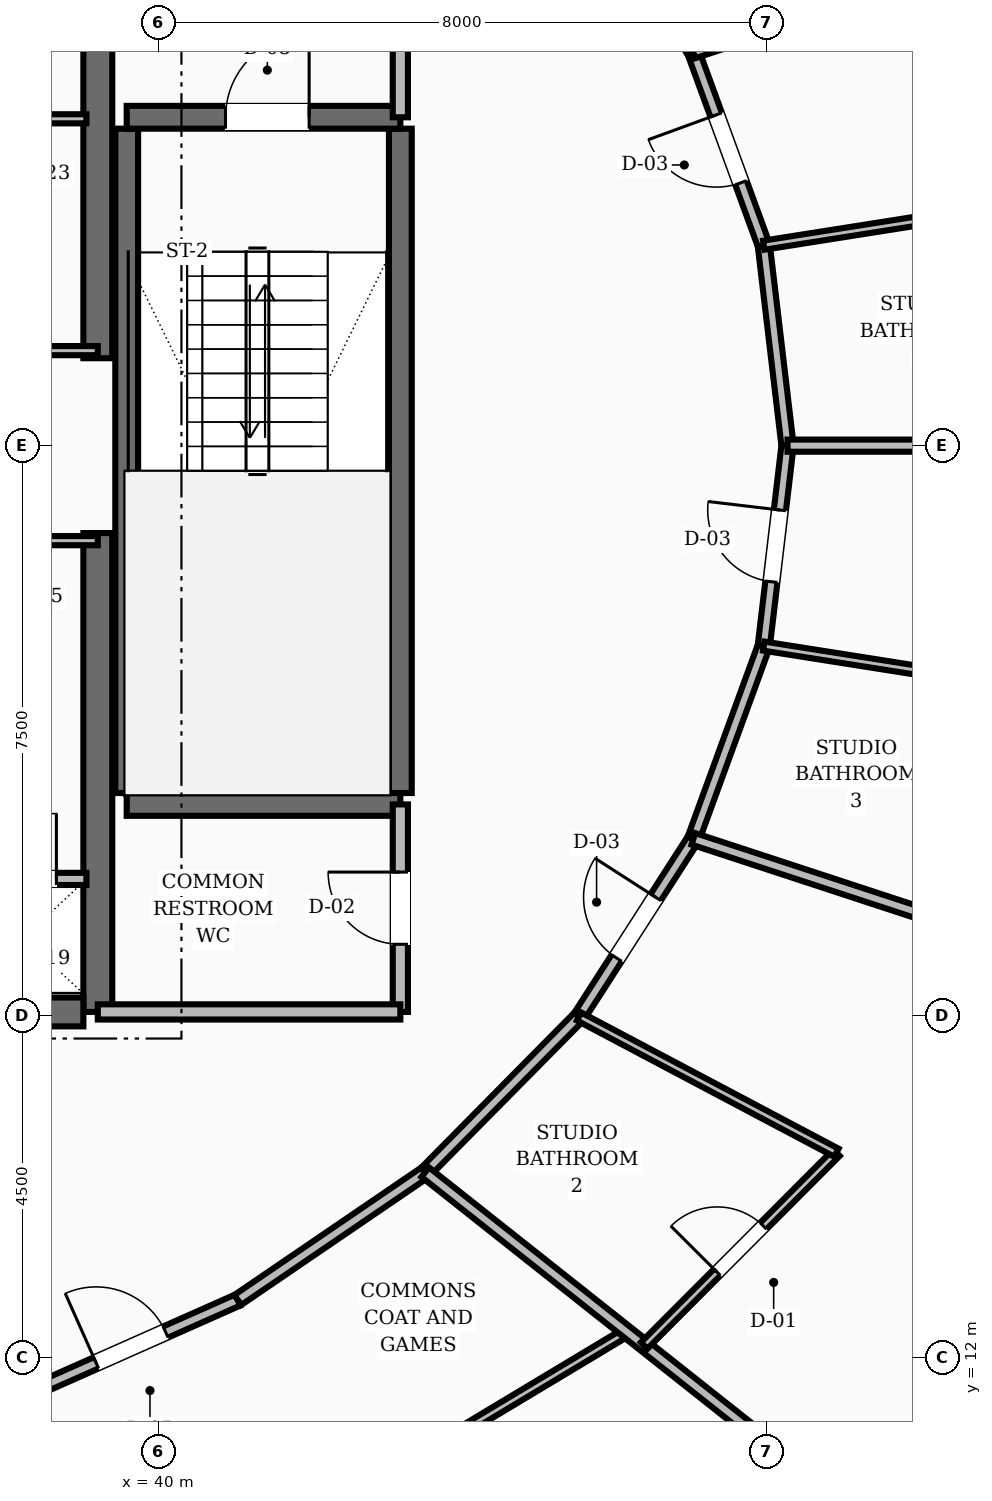
"""IFC4 building model, lengths in metres.
Left out: names, types, materials, properties, quantities, classifications, styles, units other than length and angle.
Written with IfcOpenShell. Run it as: python <this file> out.ifc"""

import sys

from ifc_helpers import new_model, si_unit, direction, frame, frame_2d, origin, place, context, subcontext, project, spatial, rectangle, extrude, element, fill, save


model = new_model("IFC4")
c1 = context("Model", 3, precision=1e-05, world=origin(), true_north=direction((0.0, 1.0)))
c2 = subcontext(c1, "Body", "Model", "MODEL_VIEW")
j1 = project(units=[si_unit("LENGTHUNIT", "METRE"), si_unit("PLANEANGLEUNIT", "RADIAN")], contexts=[c1])
p1 = place(None, origin())
s1 = spatial("IfcSite", under=j1, at=p1, CompositionType="ELEMENT")
p2 = place(p1, origin())
s2 = spatial("IfcBuilding", under=s1, at=p2, CompositionType="ELEMENT")
p3 = place(p2, frame((0.0, 0.0, 88.0)))
s3 = spatial("IfcBuildingStorey", under=s2, at=p3, CompositionType="ELEMENT", Elevation=88.0)
for number, where, z_axis, x_axis in (
    (1, (39.2, 16.55, 0.0), (0.0, 0.0, 1.0), (0.0, 1.0, 0.0)),
    (2, (39.2, 25.15, 0.0), (0.0, 0.0, 1.0), (0.0, 1.0, 0.0)),
):
    element("IfcWall", number, at=place(p3, frame(where, z_axis=z_axis, x_axis=x_axis)), inside=s3, PredefinedType="SHEAR", context=c2, shape_type="SweptSolid", body=[
        extrude(rectangle(XDim=6.3, YDim=0.38, at=frame_2d((3.15, 0.0))), origin(), (0.0, 0.0, 1.0), 3.6),
    ])
p4 = place(p3, frame((35.8, 16.55, 0.0), z_axis=(0.0, 0.0, 1.0), x_axis=(1.0, 0.0, 0.0)))
e3 = element("IfcWall", 3, at=p4, inside=s3, PredefinedType="SHEAR", context=c2, shape_type="SweptSolid", body=[
    extrude(rectangle(XDim=3.21, YDim=0.38, at=frame_2d((1.605, 0.0))), origin(), (0.0, 0.0, 1.0), 3.6),
])
p5 = place(p4, frame((0.3, 0.0, 0.0)))
e4 = element("IfcOpeningElement", 4, at=p5, cuts=e3, PredefinedType="OPENING", context=c2, shape_type="SweptSolid", body=[
    extrude(rectangle(XDim=1.1, YDim=2.1, at=frame_2d((0.55, 1.05))), frame((0.0, 0.2, 0.0), z_axis=(0.0, -1.0, 0.0), x_axis=(1.0, 0.0, 0.0)), (0.0, 0.0, 1.0), 0.4),
])
for number, where, z_axis, x_axis in (
    (5, (43.18, 19.43, 0.0), (0.0, 0.0, 1.0), (0.0, 1.0, 0.0)),
    (6, (39.58, 19.43, 0.0), (0.0, 0.0, 1.0), (0.0, 1.0, 0.0)),
):
    element("IfcWall", number, at=place(p3, frame(where, z_axis=z_axis, x_axis=x_axis)), inside=s3, PredefinedType="SHEAR", context=c2, shape_type="SweptSolid", body=[
        extrude(rectangle(XDim=8.74, YDim=0.3, at=frame_2d((4.37, 0.0))), origin(), (0.0, 0.0, 1.0), 3.6),
    ])
p6 = place(p3, frame((39.58, 19.28, 0.0), z_axis=(0.0, 0.0, 1.0), x_axis=(1.0, 0.0, 0.0)))
e7 = element("IfcWall", 7, at=p6, inside=s3, PredefinedType="SHEAR", context=c2, shape_type="SweptSolid", body=[
    extrude(rectangle(XDim=3.6, YDim=0.3, at=frame_2d((1.8, 0.0))), origin(), (0.0, 0.0, 1.0), 3.6),
])
p7 = place(p3, frame((39.58, 28.32, 0.0), z_axis=(0.0, 0.0, 1.0), x_axis=(1.0, 0.0, 0.0)))
e8 = element("IfcWall", 8, at=p7, inside=s3, PredefinedType="SHEAR", context=c2, shape_type="SweptSolid", body=[
    extrude(rectangle(XDim=3.6, YDim=0.3, at=frame_2d((1.8, 0.0))), origin(), (0.0, 0.0, 1.0), 3.6),
])
p8 = place(p7, frame((1.3, 0.0, 0.0)))
e9 = element("IfcOpeningElement", 9, at=p8, cuts=e8, PredefinedType="OPENING", context=c2, shape_type="SweptSolid", body=[
    extrude(rectangle(XDim=1.1, YDim=2.1, at=frame_2d((0.55, 1.05))), frame((0.0, 0.16, 0.0), z_axis=(0.0, -1.0, 0.0), x_axis=(1.0, 0.0, 0.0)), (0.0, 0.0, 1.0), 0.32),
])
p9 = place(p3, frame((43.18, 28.32, 0.0), z_axis=(0.0, 0.0, 1.0), x_axis=(0.0, 1.0, 0.0)))
e10 = element("IfcWall", 10, at=p9, inside=s3, PredefinedType="SOLIDWALL", context=c2, shape_type="SweptSolid", body=[
    extrude(rectangle(XDim=3.13, YDim=0.2, at=frame_2d((1.565, 0.0))), origin(), (0.0, 0.0, 1.0), 2.71),
])
p10 = place(p9, frame((1.015, 0.0, 0.0)))
e11 = element("IfcOpeningElement", 11, at=p10, cuts=e10, PredefinedType="OPENING", context=c2, shape_type="SweptSolid", body=[
    extrude(rectangle(XDim=1.1, YDim=2.1, at=frame_2d((0.55, 1.05))), frame((0.0, 0.11, 0.0), z_axis=(0.0, -1.0, 0.0), x_axis=(1.0, 0.0, 0.0)), (0.0, 0.0, 1.0), 0.22),
])
p11 = place(p3, frame((43.18, 16.55, 0.0), z_axis=(0.0, 0.0, 1.0), x_axis=(0.0, 1.0, 0.0)))
e12 = element("IfcWall", 12, at=p11, inside=s3, PredefinedType="SOLIDWALL", context=c2, shape_type="SweptSolid", body=[
    extrude(rectangle(XDim=2.73, YDim=0.2, at=frame_2d((1.365, 0.0))), origin(), (0.0, 0.0, 1.0), 2.71),
])
p12 = place(p11, frame((0.89, 0.0, 0.0)))
e13 = element("IfcOpeningElement", 13, at=p12, cuts=e12, PredefinedType="OPENING", context=c2, shape_type="SweptSolid", body=[
    extrude(rectangle(XDim=0.95, YDim=2.1, at=frame_2d((0.475, 1.05))), frame((0.0, 0.11, 0.0), z_axis=(0.0, -1.0, 0.0), x_axis=(1.0, 0.0, 0.0)), (0.0, 0.0, 1.0), 0.22),
])
p13 = place(p3, frame((39.2, 16.55, 0.0), z_axis=(0.0, 0.0, 1.0), x_axis=(1.0, 0.0, 0.0)))
e14 = element("IfcWall", 14, at=p13, inside=s3, PredefinedType="SOLIDWALL", context=c2, shape_type="SweptSolid", body=[
    extrude(rectangle(XDim=3.98, YDim=0.2, at=frame_2d((1.99, 0.0))), origin(), (0.0, 0.0, 1.0), 2.71),
])
p14 = place(p3, frame((37.4, 18.3, 0.0), z_axis=(0.0, 0.0, 1.0), x_axis=(1.0, 0.0, 0.0)))
e15 = element("IfcWall", 15, at=p14, inside=s3, PredefinedType="SOLIDWALL", context=c2, shape_type="SweptSolid", body=[
    extrude(rectangle(XDim=1.65, YDim=0.16, at=frame_2d((0.825, 0.0))), origin(), (0.0, 0.0, 1.0), 2.71),
])
p15 = place(p14, frame((0.395, 0.0, 0.0)))
e16 = element("IfcOpeningElement", 16, at=p15, cuts=e15, PredefinedType="OPENING", context=c2, shape_type="SweptSolid", body=[
    extrude(rectangle(XDim=0.86, YDim=2.1, at=frame_2d((0.43, 1.05))), frame((0.0, 0.09, 0.0), z_axis=(0.0, -1.0, 0.0), x_axis=(1.0, 0.0, 0.0)), (0.0, 0.0, 1.0), 0.18),
])
for number, where, z_axis, x_axis in (
    (17, (37.4, 25.25, 0.0), (0.0, 0.0, 1.0), (1.0, 0.0, 0.0)),
    (18, (37.4, 22.75, 0.0), (0.0, 0.0, 1.0), (1.0, 0.0, 0.0)),
):
    element("IfcWall", number, at=place(p3, frame(where, z_axis=z_axis, x_axis=x_axis)), inside=s3, PredefinedType="PARTITIONING", context=c2, shape_type="SweptSolid", body=[
        extrude(rectangle(XDim=1.8, YDim=0.12, at=frame_2d((0.9, 0.0))), origin(), (0.0, 0.0, 1.0), 2.71),
    ])
p16 = place(p3, frame((37.4, 28.3, 0.0), z_axis=(0.0, 0.0, 1.0), x_axis=(1.0, 0.0, 0.0)))
e19 = element("IfcWall", 19, at=p16, inside=s3, PredefinedType="PARTITIONING", context=c2, shape_type="SweptSolid", body=[
    extrude(rectangle(XDim=1.65, YDim=0.12, at=frame_2d((0.825, 0.0))), origin(), (0.0, 0.0, 1.0), 2.71),
])
p17 = place(p3, frame((48.274, 24.0, 0.0), z_axis=(0.0, 0.0, 1.0), x_axis=(-0.117763961213, 0.99304161516, 0.0)))
e20 = element("IfcWall", 20, at=p17, inside=s3, PredefinedType="SOLIDWALL", context=c2, shape_type="SweptSolid", body=[
    extrude(rectangle(XDim=2.656, YDim=0.16, at=frame_2d((1.328, 0.0))), origin(), (0.0, 0.0, 1.0), 2.71),
])
p18 = place(p3, frame((47.961, 26.637, 0.0), z_axis=(0.0, 0.0, 1.0), x_axis=(-0.343013437329, 0.939330496583, 0.0)))
e21 = element("IfcWall", 21, at=p18, inside=s3, PredefinedType="SOLIDWALL", context=c2, shape_type="SweptSolid", body=[
    extrude(rectangle(XDim=2.7, YDim=0.16, at=frame_2d((1.35, 0.0))), origin(), (0.0, 0.0, 1.0), 2.71),
])
p19 = place(p18, frame((0.875, 0.0, 0.0)))
e22 = element("IfcOpeningElement", 22, at=p19, cuts=e21, PredefinedType="OPENING", context=c2, shape_type="SweptSolid", body=[
    extrude(rectangle(XDim=0.95, YDim=2.1, at=frame_2d((0.475, 1.05))), frame((0.0, 0.09, 0.0), z_axis=(0.0, -1.0, 0.0), x_axis=(1.0, 0.0, 0.0)), (0.0, 0.0, 1.0), 0.18),
])
p20 = place(p3, frame((47.035, 29.173, 0.0), z_axis=(0.0, 0.0, 1.0), x_axis=(-0.541126045017, 0.840941498206, 0.0)))
e23 = element("IfcWall", 23, at=p20, inside=s3, PredefinedType="SOLIDWALL", context=c2, shape_type="SweptSolid", body=[
    extrude(rectangle(XDim=2.779, YDim=0.16, at=frame_2d((1.39, 0.0))), origin(), (0.0, 0.0, 1.0), 2.71),
])
p21 = place(p3, frame((38.228, 11.511, 0.0), z_axis=(0.0, 0.0, 1.0), x_axis=(0.913952123493, 0.405822024984, 0.0)))
e24 = element("IfcWall", 24, at=p21, inside=s3, PredefinedType="SOLIDWALL", context=c2, shape_type="SweptSolid", body=[
    extrude(rectangle(XDim=3.078, YDim=0.16, at=frame_2d((1.539, 0.0))), origin(), (0.0, 0.0, 1.0), 2.71),
])
p22 = place(p21, frame((1.039, 0.0, 0.0)))
e25 = element("IfcOpeningElement", 25, at=p22, cuts=e24, PredefinedType="OPENING", context=c2, shape_type="SweptSolid", body=[
    extrude(rectangle(XDim=1.0, YDim=2.1, at=frame_2d((0.5, 1.05))), frame((0.0, 0.09, 0.0), z_axis=(0.0, -1.0, 0.0), x_axis=(1.0, 0.0, 0.0)), (0.0, 0.0, 1.0), 0.18),
])
p23 = place(p3, frame((41.041, 12.76, 0.0), z_axis=(0.0, 0.0, 1.0), x_axis=(0.826293096206, 0.56324037423, 0.0)))
e26 = element("IfcWall", 26, at=p23, inside=s3, PredefinedType="SOLIDWALL", context=c2, shape_type="SweptSolid", body=[
    extrude(rectangle(XDim=2.985, YDim=0.16, at=frame_2d((1.492, 0.0))), origin(), (0.0, 0.0, 1.0), 2.71),
])
p24 = place(p3, frame((43.508, 14.441, 0.0), z_axis=(0.0, 0.0, 1.0), x_axis=(0.702811997, 0.711375636969, 0.0)))
e27 = element("IfcWall", 27, at=p24, inside=s3, PredefinedType="SOLIDWALL", context=c2, shape_type="SweptSolid", body=[
    extrude(rectangle(XDim=2.879, YDim=0.16, at=frame_2d((1.44, 0.0))), origin(), (0.0, 0.0, 1.0), 2.71),
])
p25 = place(p3, frame((45.531, 16.49, 0.0), z_axis=(0.0, 0.0, 1.0), x_axis=(0.541126045017, 0.840941498206, 0.0)))
e28 = element("IfcWall", 28, at=p25, inside=s3, PredefinedType="SOLIDWALL", context=c2, shape_type="SweptSolid", body=[
    extrude(rectangle(XDim=2.779, YDim=0.16, at=frame_2d((1.39, 0.0))), origin(), (0.0, 0.0, 1.0), 2.71),
])
p26 = place(p25, frame((0.915, 0.0, 0.0)))
e29 = element("IfcOpeningElement", 29, at=p26, cuts=e28, PredefinedType="OPENING", context=c2, shape_type="SweptSolid", body=[
    extrude(rectangle(XDim=0.95, YDim=2.1, at=frame_2d((0.475, 1.05))), frame((0.0, 0.09, 0.0), z_axis=(0.0, -1.0, 0.0), x_axis=(1.0, 0.0, 0.0)), (0.0, 0.0, 1.0), 0.18),
])
p27 = place(p3, frame((47.035, 18.827, 0.0), z_axis=(0.0, 0.0, 1.0), x_axis=(0.343013437329, 0.939330496583, 0.0)))
e30 = element("IfcWall", 30, at=p27, inside=s3, PredefinedType="SOLIDWALL", context=c2, shape_type="SweptSolid", body=[
    extrude(rectangle(XDim=2.7, YDim=0.16, at=frame_2d((1.35, 0.0))), origin(), (0.0, 0.0, 1.0), 2.71),
])
p28 = place(p3, frame((47.961, 21.363, 0.0), z_axis=(0.0, 0.0, 1.0), x_axis=(0.117763961213, 0.99304161516, 0.0)))
e31 = element("IfcWall", 31, at=p28, inside=s3, PredefinedType="SOLIDWALL", context=c2, shape_type="SweptSolid", body=[
    extrude(rectangle(XDim=2.656, YDim=0.16, at=frame_2d((1.328, 0.0))), origin(), (0.0, 0.0, 1.0), 2.71),
])
p29 = place(p28, frame((0.853, 0.0, 0.0)))
e32 = element("IfcOpeningElement", 32, at=p29, cuts=e31, PredefinedType="OPENING", context=c2, shape_type="SweptSolid", body=[
    extrude(rectangle(XDim=0.95, YDim=2.1, at=frame_2d((0.475, 1.05))), frame((0.0, 0.09, 0.0), z_axis=(0.0, -1.0, 0.0), x_axis=(1.0, 0.0, 0.0)), (0.0, 0.0, 1.0), 0.18),
])
p30 = place(p3, frame((43.017, 10.453, 0.0), z_axis=(0.0, 0.0, 1.0), x_axis=(0.857287225794, 0.514838433385, 0.0)))
e33 = element("IfcWall", 33, at=p30, inside=s3, PredefinedType="PARTITIONING", context=c2, shape_type="SweptSolid", body=[
    extrude(rectangle(XDim=3.667, YDim=0.12, at=frame_2d((1.833, 0.0))), origin(), (0.0, 0.0, 1.0), 2.71),
])
p31 = place(p3, frame((43.508, 14.441, 0.0), z_axis=(0.0, 0.0, 1.0), x_axis=(0.783915576776, -0.620867432298, 0.0)))
e34 = element("IfcWall", 34, at=p31, inside=s3, PredefinedType="SOLIDWALL", context=c2, shape_type="SweptSolid", body=[
    extrude(rectangle(XDim=9.617, YDim=0.16, at=frame_2d((4.809, 0.0))), origin(), (0.0, 0.0, 1.0), 2.71),
])
p32 = place(p3, frame((46.387, 12.16, 0.0), z_axis=(0.0, 0.0, 1.0), x_axis=(0.706152338319, 0.708059937496, 0.0)))
e35 = element("IfcWall", 35, at=p32, inside=s3, PredefinedType="PARTITIONING", context=c2, shape_type="SweptSolid", body=[
    extrude(rectangle(XDim=3.583, YDim=0.12, at=frame_2d((1.792, 0.0))), origin(), (0.0, 0.0, 1.0), 2.71),
])
p33 = place(p32, frame((1.362, 0.0, 0.0)))
e36 = element("IfcOpeningElement", 36, at=p33, cuts=e35, PredefinedType="OPENING", context=c2, shape_type="SweptSolid", body=[
    extrude(rectangle(XDim=0.86, YDim=2.1, at=frame_2d((0.43, 1.05))), frame((0.0, 0.07, 0.0), z_axis=(0.0, -1.0, 0.0), x_axis=(1.0, 0.0, 0.0)), (0.0, 0.0, 1.0), 0.14),
])
p34 = place(p3, frame((45.531, 16.49, 0.0), z_axis=(0.0, 0.0, 1.0), x_axis=(0.883879348267, -0.46771497486, 0.0)))
e37 = element("IfcWall", 37, at=p34, inside=s3, PredefinedType="PARTITIONING", context=c2, shape_type="SweptSolid", body=[
    extrude(rectangle(XDim=3.831, YDim=0.12, at=frame_2d((1.916, 0.0))), origin(), (0.0, 0.0, 1.0), 2.71),
])
p35 = place(p3, frame((47.035, 18.827, 0.0), z_axis=(0.0, 0.0, 1.0), x_axis=(0.950181432226, -0.311697362603, 0.0)))
e38 = element("IfcWall", 38, at=p35, inside=s3, PredefinedType="SOLIDWALL", context=c2, shape_type="SweptSolid", body=[
    extrude(rectangle(XDim=10.371, YDim=0.16, at=frame_2d((5.186, 0.0))), origin(), (0.0, 0.0, 1.0), 2.71),
])
p36 = place(p3, frame((47.961, 21.363, 0.0), z_axis=(0.0, 0.0, 1.0), x_axis=(0.987813821357, -0.155640143715, 0.0)))
e39 = element("IfcWall", 39, at=p36, inside=s3, PredefinedType="PARTITIONING", context=c2, shape_type="SweptSolid", body=[
    extrude(rectangle(XDim=4.044, YDim=0.12, at=frame_2d((2.022, 0.0))), origin(), (0.0, 0.0, 1.0), 2.71),
])
p37 = place(p3, frame((48.274, 24.0, 0.0), z_axis=(0.0, 0.0, 1.0), x_axis=(1.0, 0.0, 0.0)))
e40 = element("IfcWall", 40, at=p37, inside=s3, PredefinedType="SOLIDWALL", context=c2, shape_type="SweptSolid", body=[
    extrude(rectangle(XDim=10.668, YDim=0.16, at=frame_2d((5.334, 0.0))), origin(), (0.0, 0.0, 1.0), 2.71),
])
p38 = place(p3, frame((47.961, 26.637, 0.0), z_axis=(0.0, 0.0, 1.0), x_axis=(0.987813821357, 0.155640143715, 0.0)))
e41 = element("IfcWall", 41, at=p38, inside=s3, PredefinedType="PARTITIONING", context=c2, shape_type="SweptSolid", body=[
    extrude(rectangle(XDim=4.044, YDim=0.12, at=frame_2d((2.022, 0.0))), origin(), (0.0, 0.0, 1.0), 2.71),
])
p39 = place(p3, frame((47.035, 29.173, 0.0), z_axis=(0.0, 0.0, 1.0), x_axis=(0.950181432226, 0.311697362603, 0.0)))
e42 = element("IfcWall", 42, at=p39, inside=s3, PredefinedType="SOLIDWALL", context=c2, shape_type="SweptSolid", body=[
    extrude(rectangle(XDim=10.371, YDim=0.16, at=frame_2d((5.186, 0.0))), origin(), (0.0, 0.0, 1.0), 2.71),
])
p40 = place(p8, origin())
e43 = element("IfcDoor", 43, at=p40, inside=s3, OperationType="SINGLE_SWING_RIGHT", PredefinedType="DOOR", context=c2, shape_type="SweptSolid", body=[
    extrude(rectangle(XDim=1.1, YDim=2.1, at=frame_2d((0.55, 1.05))), frame((0.0, 0.025, 0.0), z_axis=(0.0, -1.0, 0.0), x_axis=(1.0, 0.0, 0.0)), (0.0, 0.0, 1.0), 0.05),
])
fill(e9, e43)
p41 = place(p12, origin())
e44 = element("IfcDoor", 44, at=p41, inside=s3, OperationType="SINGLE_SWING_RIGHT", PredefinedType="DOOR", context=c2, shape_type="SweptSolid", body=[
    extrude(rectangle(XDim=0.95, YDim=2.1, at=frame_2d((0.475, 1.05))), frame((0.0, 0.025, 0.0), z_axis=(0.0, -1.0, 0.0), x_axis=(1.0, 0.0, 0.0)), (0.0, 0.0, 1.0), 0.05),
])
fill(e13, e44)
p42 = place(p15, origin())
e45 = element("IfcDoor", 45, at=p42, inside=s3, OperationType="SINGLE_SWING_RIGHT", PredefinedType="TRAPDOOR", context=c2, shape_type="SweptSolid", body=[
    extrude(rectangle(XDim=0.86, YDim=2.1, at=frame_2d((0.43, 1.05))), frame((0.0, 0.025, 0.0), z_axis=(0.0, -1.0, 0.0), x_axis=(1.0, 0.0, 0.0)), (0.0, 0.0, 1.0), 0.05),
])
fill(e16, e45)
p43 = place(p22, origin())
e46 = element("IfcDoor", 46, at=p43, inside=s3, OperationType="SINGLE_SWING_LEFT", PredefinedType="DOOR", context=c2, shape_type="SweptSolid", body=[
    extrude(rectangle(XDim=1.0, YDim=2.1, at=frame_2d((0.5, 1.05))), frame((0.0, 0.025, 0.0), z_axis=(0.0, -1.0, 0.0), x_axis=(1.0, 0.0, 0.0)), (0.0, 0.0, 1.0), 0.05),
])
fill(e25, e46)
p44 = place(p33, origin())
e47 = element("IfcDoor", 47, at=p44, inside=s3, OperationType="SINGLE_SWING_LEFT", PredefinedType="DOOR", context=c2, shape_type="SweptSolid", body=[
    extrude(rectangle(XDim=0.86, YDim=2.1, at=frame_2d((0.43, 1.05))), frame((0.0, 0.025, 0.0), z_axis=(0.0, -1.0, 0.0), x_axis=(1.0, 0.0, 0.0)), (0.0, 0.0, 1.0), 0.05),
])
fill(e36, e47)
p45 = place(p26, origin())
e48 = element("IfcDoor", 48, at=p45, inside=s3, OperationType="SINGLE_SWING_RIGHT", PredefinedType="DOOR", context=c2, shape_type="SweptSolid", body=[
    extrude(rectangle(XDim=0.95, YDim=2.1, at=frame_2d((0.475, 1.05))), frame((0.0, 0.025, 0.0), z_axis=(0.0, -1.0, 0.0), x_axis=(1.0, 0.0, 0.0)), (0.0, 0.0, 1.0), 0.05),
])
fill(e29, e48)
p46 = place(p29, origin())
e49 = element("IfcDoor", 49, at=p46, inside=s3, OperationType="SINGLE_SWING_RIGHT", PredefinedType="DOOR", context=c2, shape_type="SweptSolid", body=[
    extrude(rectangle(XDim=0.95, YDim=2.1, at=frame_2d((0.475, 1.05))), frame((0.0, 0.025, 0.0), z_axis=(0.0, -1.0, 0.0), x_axis=(1.0, 0.0, 0.0)), (0.0, 0.0, 1.0), 0.05),
])
fill(e32, e49)
p47 = place(p19, origin())
e50 = element("IfcDoor", 50, at=p47, inside=s3, OperationType="SINGLE_SWING_RIGHT", PredefinedType="DOOR", context=c2, shape_type="SweptSolid", body=[
    extrude(rectangle(XDim=0.95, YDim=2.1, at=frame_2d((0.475, 1.05))), frame((0.0, 0.025, 0.0), z_axis=(0.0, -1.0, 0.0), x_axis=(1.0, 0.0, 0.0)), (0.0, 0.0, 1.0), 0.05),
])
fill(e22, e50)
save(model, sys.argv[1])
